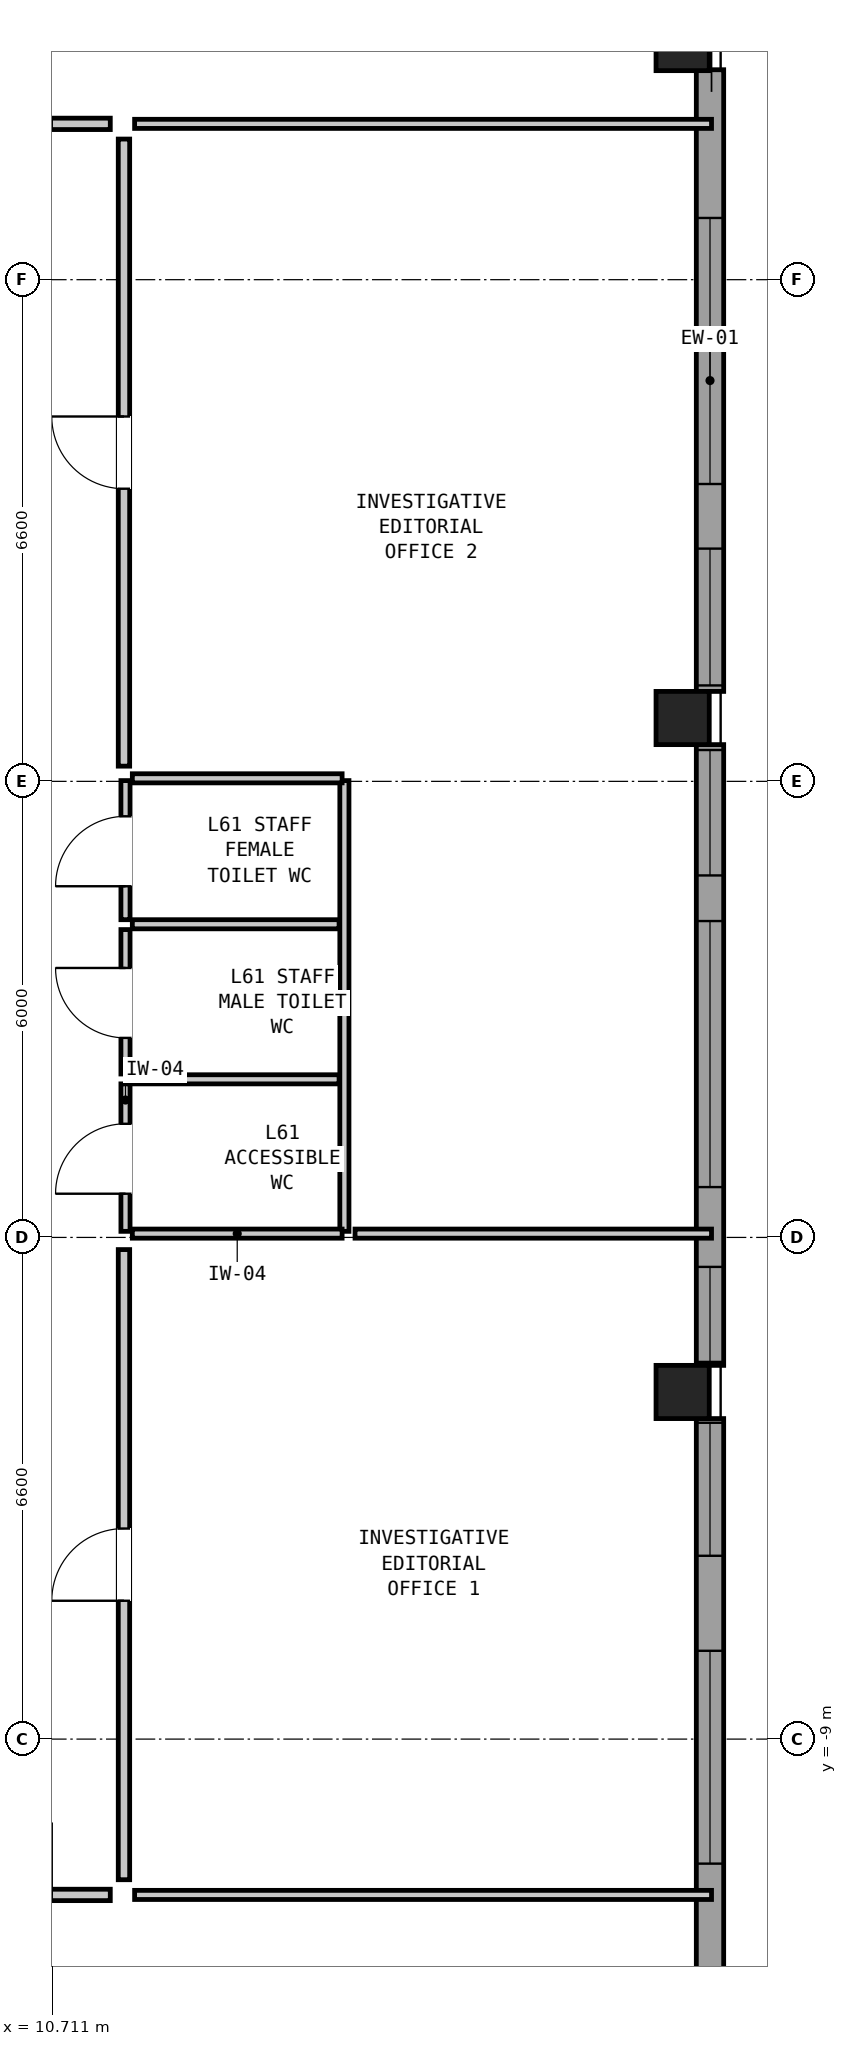
"""IFC4 building model, lengths in metres.
Left out: names, types, materials, properties, quantities, classifications, styles, units other than length and angle.
Written with IfcOpenShell. Run it as: python <this file> out.ifc"""

import sys

from ifc_helpers import new_model, si_unit, direction, frame, frame_2d, origin, origin_2d, place, context, subcontext, project, spatial, rectangle, hollow_rectangle, extrude, element, fill, save


model = new_model("IFC4")
c1 = context("Model", 3, precision=1e-05, world=origin(), true_north=direction((0.0, 1.0)))
c2 = subcontext(c1, "Body", "Model", "MODEL_VIEW")
j1 = project(units=[si_unit("LENGTHUNIT", "METRE"), si_unit("PLANEANGLEUNIT", "RADIAN")], contexts=[c1])
p1 = place(None, origin())
s1 = spatial("IfcSite", under=j1, at=p1, CompositionType="ELEMENT")
p2 = place(p1, origin())
s2 = spatial("IfcBuilding", under=s1, at=p2, CompositionType="ELEMENT")
p3 = place(p2, frame((0.0, 0.0, 208.65)))
s3 = spatial("IfcBuildingStorey", under=s2, at=p3, CompositionType="ELEMENT", Elevation=208.65)
for number, where, z_axis, x_axis in (
    (1, (19.0, -4.433, 0.0), (0.0, 0.0, 1.0), (0.0, 1.0, 0.0)),
    (2, (19.0, 4.433, 0.0), (0.0, 0.0, 1.0), (0.0, 1.0, 0.0)),
    (3, (19.0, 13.3, 0.0), (0.0, 0.0, 1.0), (0.0, 1.0, 0.0)),
):
    element("IfcColumn", number, at=place(p3, frame(where, z_axis=z_axis, x_axis=x_axis)), inside=s3, PredefinedType="COLUMN", context=c2, shape_type="SweptSolid", body=[
        extrude(hollow_rectangle(XDim=0.7, YDim=0.7, WallThickness=0.045, at=origin_2d()), origin(), (0.0, 0.0, 1.0), 3.05),
    ])
p4 = place(p3, frame((19.36, 12.962, 0.0), z_axis=(0.0, 0.0, 1.0), x_axis=(0.0, -1.0, 0.0)))
e4 = element("IfcWall", 4, at=p4, inside=s3, PredefinedType="SOLIDWALL", context=c2, shape_type="SweptSolid", body=[
    extrude(rectangle(XDim=8.179, YDim=0.36, at=frame_2d((4.089, 0.0))), origin(), (0.0, 0.0, 1.0), 2.374),
])
p5 = place(p4, frame((1.95, 0.0, 0.2)))
e5 = element("IfcOpeningElement", 5, at=p5, cuts=e4, PredefinedType="OPENING", context=c2, shape_type="SweptSolid", body=[
    extrude(rectangle(XDim=3.5, YDim=0.95, at=frame_2d((1.75, 0.475))), frame((0.0, 0.192, 0.0), z_axis=(0.0, -1.0, 0.0), x_axis=(1.0, 0.0, 0.0)), (0.0, 0.0, 1.0), 0.384),
])
p6 = place(p4, frame((6.3, 0.0, 1.15)))
e6 = element("IfcOpeningElement", 6, at=p6, cuts=e4, PredefinedType="OPENING", context=c2, shape_type="SweptSolid", body=[
    extrude(rectangle(XDim=1.8, YDim=1.05, at=frame_2d((0.9, 0.525))), frame((0.0, 0.192, 0.0), z_axis=(0.0, -1.0, 0.0), x_axis=(1.0, 0.0, 0.0)), (0.0, 0.0, 1.0), 0.384),
])
p7 = place(p3, frame((19.36, 4.083, 0.0), z_axis=(0.0, 0.0, 1.0), x_axis=(0.0, -1.0, 0.0)))
e7 = element("IfcWall", 7, at=p7, inside=s3, PredefinedType="SOLIDWALL", context=c2, shape_type="SweptSolid", body=[
    extrude(rectangle(XDim=8.167, YDim=0.36, at=frame_2d((4.083, 0.0))), origin(), (0.0, 0.0, 1.0), 2.374),
])
p8 = place(p7, frame((0.071, 0.0, 1.3)))
e8 = element("IfcOpeningElement", 8, at=p8, cuts=e7, PredefinedType="OPENING", context=c2, shape_type="SweptSolid", body=[
    extrude(rectangle(XDim=1.65, YDim=0.9, at=frame_2d((0.825, 0.45))), frame((0.0, 0.192, 0.0), z_axis=(0.0, -1.0, 0.0), x_axis=(1.0, 0.0, 0.0)), (0.0, 0.0, 1.0), 0.384),
])
p9 = place(p7, frame((2.321, 0.0, 0.2)))
e9 = element("IfcOpeningElement", 9, at=p9, cuts=e7, PredefinedType="OPENING", context=c2, shape_type="SweptSolid", body=[
    extrude(rectangle(XDim=3.5, YDim=0.95, at=frame_2d((1.75, 0.475))), frame((0.0, 0.192, 0.0), z_axis=(0.0, -1.0, 0.0), x_axis=(1.0, 0.0, 0.0)), (0.0, 0.0, 1.0), 0.384),
])
p10 = place(p7, frame((6.871, 0.0, 1.05)))
e10 = element("IfcOpeningElement", 10, at=p10, cuts=e7, PredefinedType="OPENING", context=c2, shape_type="SweptSolid", body=[
    extrude(rectangle(XDim=1.25, YDim=1.15, at=frame_2d((0.625, 0.575))), frame((0.0, 0.192, 0.0), z_axis=(0.0, -1.0, 0.0), x_axis=(1.0, 0.0, 0.0)), (0.0, 0.0, 1.0), 0.384),
])
p11 = place(p3, frame((19.36, -4.783, 0.0), z_axis=(0.0, 0.0, 1.0), x_axis=(0.0, -1.0, 0.0)))
e11 = element("IfcWall", 11, at=p11, inside=s3, PredefinedType="SOLIDWALL", context=c2, shape_type="SweptSolid", body=[
    extrude(rectangle(XDim=8.179, YDim=0.36, at=frame_2d((4.089, 0.0))), origin(), (0.0, 0.0, 1.0), 2.374),
])
p12 = place(p11, frame((0.055, 0.0, 1.1)))
e12 = element("IfcOpeningElement", 12, at=p12, cuts=e11, PredefinedType="OPENING", context=c2, shape_type="SweptSolid", body=[
    extrude(rectangle(XDim=1.75, YDim=1.1, at=frame_2d((0.875, 0.55))), frame((0.0, 0.192, 0.0), z_axis=(0.0, -1.0, 0.0), x_axis=(1.0, 0.0, 0.0)), (0.0, 0.0, 1.0), 0.384),
])
p13 = place(p11, frame((3.055, 0.0, 0.2)))
e13 = element("IfcOpeningElement", 13, at=p13, cuts=e11, PredefinedType="OPENING", context=c2, shape_type="SweptSolid", body=[
    extrude(rectangle(XDim=2.8, YDim=1.15, at=frame_2d((1.4, 0.575))), frame((0.0, 0.192, 0.0), z_axis=(0.0, -1.0, 0.0), x_axis=(1.0, 0.0, 0.0)), (0.0, 0.0, 1.0), 0.384),
])
p14 = place(p3, frame((11.67, -2.32, 0.0), z_axis=(0.0, 0.0, 1.0), x_axis=(0.0, 1.0, 0.0)))
e14 = element("IfcWall", 14, at=p14, inside=s3, PredefinedType="PARTITIONING", context=c2, shape_type="SweptSolid", body=[
    extrude(rectangle(XDim=1.94, YDim=0.12, at=frame_2d((0.97, 0.0))), origin(), (0.0, 0.0, 1.0), 2.86),
])
p15 = place(p14, frame((0.495, 0.0, 0.0)))
e15 = element("IfcOpeningElement", 15, at=p15, cuts=e14, PredefinedType="OPENING", context=c2, shape_type="SweptSolid", body=[
    extrude(rectangle(XDim=0.92, YDim=2.1, at=frame_2d((0.46, 1.05))), frame((0.0, 0.072, 0.0), z_axis=(0.0, -1.0, 0.0), x_axis=(1.0, 0.0, 0.0)), (0.0, 0.0, 1.0), 0.144),
])
p16 = place(p3, frame((11.67, -0.25, 0.0), z_axis=(0.0, 0.0, 1.0), x_axis=(0.0, 1.0, 0.0)))
e16 = element("IfcWall", 16, at=p16, inside=s3, PredefinedType="PARTITIONING", context=c2, shape_type="SweptSolid", body=[
    extrude(rectangle(XDim=1.9, YDim=0.12, at=frame_2d((0.95, 0.0))), origin(), (0.0, 0.0, 1.0), 2.86),
])
p17 = place(p16, frame((0.475, 0.0, 0.0)))
e17 = element("IfcOpeningElement", 17, at=p17, cuts=e16, PredefinedType="OPENING", context=c2, shape_type="SweptSolid", body=[
    extrude(rectangle(XDim=0.92, YDim=2.1, at=frame_2d((0.46, 1.05))), frame((0.0, 0.072, 0.0), z_axis=(0.0, -1.0, 0.0), x_axis=(1.0, 0.0, 0.0)), (0.0, 0.0, 1.0), 0.144),
])
p18 = place(p3, frame((11.67, 1.78, 0.0), z_axis=(0.0, 0.0, 1.0), x_axis=(0.0, 1.0, 0.0)))
e18 = element("IfcWall", 18, at=p18, inside=s3, PredefinedType="PARTITIONING", context=c2, shape_type="SweptSolid", body=[
    extrude(rectangle(XDim=1.83, YDim=0.12, at=frame_2d((0.915, 0.0))), origin(), (0.0, 0.0, 1.0), 2.86),
])
p19 = place(p18, frame((0.44, 0.0, 0.0)))
e19 = element("IfcOpeningElement", 19, at=p19, cuts=e18, PredefinedType="OPENING", context=c2, shape_type="SweptSolid", body=[
    extrude(rectangle(XDim=0.92, YDim=2.1, at=frame_2d((0.46, 1.05))), frame((0.0, 0.072, 0.0), z_axis=(0.0, -1.0, 0.0), x_axis=(1.0, 0.0, 0.0)), (0.0, 0.0, 1.0), 0.144),
])
p20 = place(p3, frame((14.55, -2.32, 0.0), z_axis=(0.0, 0.0, 1.0), x_axis=(0.0, 1.0, 0.0)))
e20 = element("IfcWall", 20, at=p20, inside=s3, PredefinedType="PARTITIONING", context=c2, shape_type="SweptSolid", body=[
    extrude(rectangle(XDim=5.93, YDim=0.12, at=frame_2d((2.965, 0.0))), origin(), (0.0, 0.0, 1.0), 2.86),
])
for number, where, z_axis, x_axis in (
    (21, (11.76, -2.35, 0.0), (0.0, 0.0, 1.0), (1.0, 0.0, 0.0)),
    (22, (11.76, 3.64, 0.0), (0.0, 0.0, 1.0), (1.0, 0.0, 0.0)),
):
    element("IfcWall", number, at=place(p3, frame(where, z_axis=z_axis, x_axis=x_axis)), inside=s3, PredefinedType="PARTITIONING", context=c2, shape_type="SweptSolid", body=[
        extrude(rectangle(XDim=2.76, YDim=0.12, at=frame_2d((1.38, 0.0))), origin(), (0.0, 0.0, 1.0), 1.981),
    ])
for number, where, z_axis, x_axis in (
    (23, (11.76, -0.32, 0.0), (0.0, 0.0, 1.0), (1.0, 0.0, 0.0)),
    (24, (11.76, 1.72, 0.0), (0.0, 0.0, 1.0), (1.0, 0.0, 0.0)),
):
    element("IfcWall", number, at=place(p3, frame(where, z_axis=z_axis, x_axis=x_axis)), inside=s3, PredefinedType="PARTITIONING", context=c2, shape_type="SweptSolid", body=[
        extrude(rectangle(XDim=2.72, YDim=0.12, at=frame_2d((1.36, 0.0))), origin(), (0.0, 0.0, 1.0), 2.86),
    ])
for number, where, z_axis, x_axis in (
    (25, (11.79, 12.25, 0.0), (0.0, 0.0, 1.0), (1.0, 0.0, 0.0)),
    (26, (11.79, -11.05, 0.0), (0.0, 0.0, 1.0), (1.0, 0.0, 0.0)),
):
    element("IfcWall", number, at=place(p3, frame(where, z_axis=z_axis, x_axis=x_axis)), inside=s3, PredefinedType="PARTITIONING", context=c2, shape_type="SweptSolid", body=[
        extrude(rectangle(XDim=7.59, YDim=0.12, at=frame_2d((3.795, 0.0))), origin(), (0.0, 0.0, 1.0), 2.86),
    ])
p21 = place(p3, frame((14.69, -2.35, 0.0), z_axis=(0.0, 0.0, 1.0), x_axis=(1.0, 0.0, 0.0)))
e27 = element("IfcWall", 27, at=p21, inside=s3, PredefinedType="PARTITIONING", context=c2, shape_type="SweptSolid", body=[
    extrude(rectangle(XDim=4.69, YDim=0.12, at=frame_2d((2.345, 0.0))), origin(), (0.0, 0.0, 1.0), 1.981),
])
p22 = place(p3, frame((8.58, 12.25, 0.0), z_axis=(0.0, 0.0, 1.0), x_axis=(1.0, 0.0, 0.0)))
e28 = element("IfcWall", 28, at=p22, inside=s3, PredefinedType="PARTITIONING", context=c2, shape_type="SweptSolid", body=[
    extrude(rectangle(XDim=2.89, YDim=0.15, at=frame_2d((1.445, 0.0))), origin(), (0.0, 0.0, 1.0), 2.86),
])
p23 = place(p22, frame((1.17, 0.0, 0.0)))
e29 = element("IfcOpeningElement", 29, at=p23, cuts=e28, PredefinedType="OPENING", context=c2, shape_type="SweptSolid", body=[
    extrude(rectangle(XDim=0.95, YDim=2.1, at=frame_2d((0.475, 1.05))), frame((0.0, 0.087, 0.0), z_axis=(0.0, -1.0, 0.0), x_axis=(1.0, 0.0, 0.0)), (0.0, 0.0, 1.0), 0.174),
])
p24 = place(p3, frame((8.58, -11.05, 0.0), z_axis=(0.0, 0.0, 1.0), x_axis=(1.0, 0.0, 0.0)))
e30 = element("IfcWall", 30, at=p24, inside=s3, PredefinedType="PARTITIONING", context=c2, shape_type="SweptSolid", body=[
    extrude(rectangle(XDim=2.89, YDim=0.15, at=frame_2d((1.445, 0.0))), origin(), (0.0, 0.0, 1.0), 2.86),
])
p25 = place(p24, frame((1.17, 0.0, 0.0)))
e31 = element("IfcOpeningElement", 31, at=p25, cuts=e30, PredefinedType="OPENING", context=c2, shape_type="SweptSolid", body=[
    extrude(rectangle(XDim=0.95, YDim=2.1, at=frame_2d((0.475, 1.05))), frame((0.0, 0.087, 0.0), z_axis=(0.0, -1.0, 0.0), x_axis=(1.0, 0.0, 0.0)), (0.0, 0.0, 1.0), 0.174),
])
p26 = place(p3, frame((11.65, -10.85, 0.0), z_axis=(0.0, 0.0, 1.0), x_axis=(0.0, 1.0, 0.0)))
e32 = element("IfcWall", 32, at=p26, inside=s3, PredefinedType="PARTITIONING", context=c2, shape_type="SweptSolid", body=[
    extrude(rectangle(XDim=8.29, YDim=0.15, at=frame_2d((4.145, 0.0))), origin(), (0.0, 0.0, 1.0), 2.86),
])
p27 = place(p26, frame((3.67, 0.0, 0.0)))
e33 = element("IfcOpeningElement", 33, at=p27, cuts=e32, PredefinedType="OPENING", context=c2, shape_type="SweptSolid", body=[
    extrude(rectangle(XDim=0.95, YDim=2.1, at=frame_2d((0.475, 1.05))), frame((0.0, 0.087, 0.0), z_axis=(0.0, -1.0, 0.0), x_axis=(1.0, 0.0, 0.0)), (0.0, 0.0, 1.0), 0.174),
])
p28 = place(p3, frame((11.65, 3.8, 0.0), z_axis=(0.0, 0.0, 1.0), x_axis=(0.0, 1.0, 0.0)))
e34 = element("IfcWall", 34, at=p28, inside=s3, PredefinedType="PARTITIONING", context=c2, shape_type="SweptSolid", body=[
    extrude(rectangle(XDim=8.25, YDim=0.15, at=frame_2d((4.125, 0.0))), origin(), (0.0, 0.0, 1.0), 2.86),
])
p29 = place(p28, frame((3.65, 0.0, 0.0)))
e35 = element("IfcOpeningElement", 35, at=p29, cuts=e34, PredefinedType="OPENING", context=c2, shape_type="SweptSolid", body=[
    extrude(rectangle(XDim=0.95, YDim=2.1, at=frame_2d((0.475, 1.05))), frame((0.0, 0.087, 0.0), z_axis=(0.0, -1.0, 0.0), x_axis=(1.0, 0.0, 0.0)), (0.0, 0.0, 1.0), 0.174),
])
p30 = place(p5, origin())
e36 = element("IfcWindow", 36, at=p30, inside=s3, PartitioningType="SINGLE_PANEL", PredefinedType="WINDOW", context=c2, shape_type="SweptSolid", body=[
    extrude(rectangle(XDim=3.5, YDim=0.95, at=frame_2d((1.75, 0.475))), frame((0.0, 0.03, 0.0), z_axis=(0.0, -1.0, 0.0), x_axis=(1.0, 0.0, 0.0)), (0.0, 0.0, 1.0), 0.06),
])
fill(e5, e36)
p31 = place(p6, origin())
e37 = element("IfcWindow", 37, at=p31, inside=s3, PartitioningType="SINGLE_PANEL", PredefinedType="WINDOW", context=c2, shape_type="SweptSolid", body=[
    extrude(rectangle(XDim=1.8, YDim=1.05, at=frame_2d((0.9, 0.525))), frame((0.0, 0.03, 0.0), z_axis=(0.0, -1.0, 0.0), x_axis=(1.0, 0.0, 0.0)), (0.0, 0.0, 1.0), 0.06),
])
fill(e6, e37)
p32 = place(p8, origin())
e38 = element("IfcWindow", 38, at=p32, inside=s3, PartitioningType="SINGLE_PANEL", PredefinedType="WINDOW", context=c2, shape_type="SweptSolid", body=[
    extrude(rectangle(XDim=1.65, YDim=0.9, at=frame_2d((0.825, 0.45))), frame((0.0, 0.03, 0.0), z_axis=(0.0, -1.0, 0.0), x_axis=(1.0, 0.0, 0.0)), (0.0, 0.0, 1.0), 0.06),
])
fill(e8, e38)
p33 = place(p9, origin())
e39 = element("IfcWindow", 39, at=p33, inside=s3, PartitioningType="SINGLE_PANEL", PredefinedType="WINDOW", context=c2, shape_type="SweptSolid", body=[
    extrude(rectangle(XDim=3.5, YDim=0.95, at=frame_2d((1.75, 0.475))), frame((0.0, 0.03, 0.0), z_axis=(0.0, -1.0, 0.0), x_axis=(1.0, 0.0, 0.0)), (0.0, 0.0, 1.0), 0.06),
])
fill(e9, e39)
p34 = place(p10, origin())
e40 = element("IfcWindow", 40, at=p34, inside=s3, PartitioningType="SINGLE_PANEL", PredefinedType="WINDOW", context=c2, shape_type="SweptSolid", body=[
    extrude(rectangle(XDim=1.25, YDim=1.15, at=frame_2d((0.625, 0.575))), frame((0.0, 0.03, 0.0), z_axis=(0.0, -1.0, 0.0), x_axis=(1.0, 0.0, 0.0)), (0.0, 0.0, 1.0), 0.06),
])
fill(e10, e40)
p35 = place(p12, origin())
e41 = element("IfcWindow", 41, at=p35, inside=s3, PartitioningType="SINGLE_PANEL", PredefinedType="WINDOW", context=c2, shape_type="SweptSolid", body=[
    extrude(rectangle(XDim=1.75, YDim=1.1, at=frame_2d((0.875, 0.55))), frame((0.0, 0.03, 0.0), z_axis=(0.0, -1.0, 0.0), x_axis=(1.0, 0.0, 0.0)), (0.0, 0.0, 1.0), 0.06),
])
fill(e12, e41)
p36 = place(p13, origin())
e42 = element("IfcWindow", 42, at=p36, inside=s3, PartitioningType="SINGLE_PANEL", PredefinedType="WINDOW", context=c2, shape_type="SweptSolid", body=[
    extrude(rectangle(XDim=2.8, YDim=1.15, at=frame_2d((1.4, 0.575))), frame((0.0, 0.03, 0.0), z_axis=(0.0, -1.0, 0.0), x_axis=(1.0, 0.0, 0.0)), (0.0, 0.0, 1.0), 0.06),
])
fill(e13, e42)
p37 = place(p15, origin())
e43 = element("IfcDoor", 43, at=p37, inside=s3, OperationType="SINGLE_SWING_LEFT", PredefinedType="DOOR", context=c2, shape_type="SweptSolid", body=[
    extrude(rectangle(XDim=0.92, YDim=2.1, at=frame_2d((0.46, 1.05))), frame((0.0, 0.025, 0.0), z_axis=(0.0, -1.0, 0.0), x_axis=(1.0, 0.0, 0.0)), (0.0, 0.0, 1.0), 0.05),
])
fill(e15, e43)
p38 = place(p17, origin())
e44 = element("IfcDoor", 44, at=p38, inside=s3, OperationType="SINGLE_SWING_RIGHT", PredefinedType="DOOR", context=c2, shape_type="SweptSolid", body=[
    extrude(rectangle(XDim=0.92, YDim=2.1, at=frame_2d((0.46, 1.05))), frame((0.0, 0.025, 0.0), z_axis=(0.0, -1.0, 0.0), x_axis=(1.0, 0.0, 0.0)), (0.0, 0.0, 1.0), 0.05),
])
fill(e17, e44)
p39 = place(p19, origin())
e45 = element("IfcDoor", 45, at=p39, inside=s3, OperationType="SINGLE_SWING_LEFT", PredefinedType="DOOR", context=c2, shape_type="SweptSolid", body=[
    extrude(rectangle(XDim=0.92, YDim=2.1, at=frame_2d((0.46, 1.05))), frame((0.0, 0.025, 0.0), z_axis=(0.0, -1.0, 0.0), x_axis=(1.0, 0.0, 0.0)), (0.0, 0.0, 1.0), 0.05),
])
fill(e19, e45)
p40 = place(p27, origin())
e46 = element("IfcDoor", 46, at=p40, inside=s3, OperationType="SINGLE_SWING_LEFT", PredefinedType="DOOR", context=c2, shape_type="SweptSolid", body=[
    extrude(rectangle(XDim=0.95, YDim=2.1, at=frame_2d((0.475, 1.05))), frame((0.0, 0.025, 0.0), z_axis=(0.0, -1.0, 0.0), x_axis=(1.0, 0.0, 0.0)), (0.0, 0.0, 1.0), 0.05),
])
fill(e33, e46)
p41 = place(p29, origin())
e47 = element("IfcDoor", 47, at=p41, inside=s3, OperationType="SINGLE_SWING_RIGHT", PredefinedType="DOOR", context=c2, shape_type="SweptSolid", body=[
    extrude(rectangle(XDim=0.95, YDim=2.1, at=frame_2d((0.475, 1.05))), frame((0.0, 0.025, 0.0), z_axis=(0.0, -1.0, 0.0), x_axis=(1.0, 0.0, 0.0)), (0.0, 0.0, 1.0), 0.05),
])
fill(e35, e47)
save(model, sys.argv[1])
